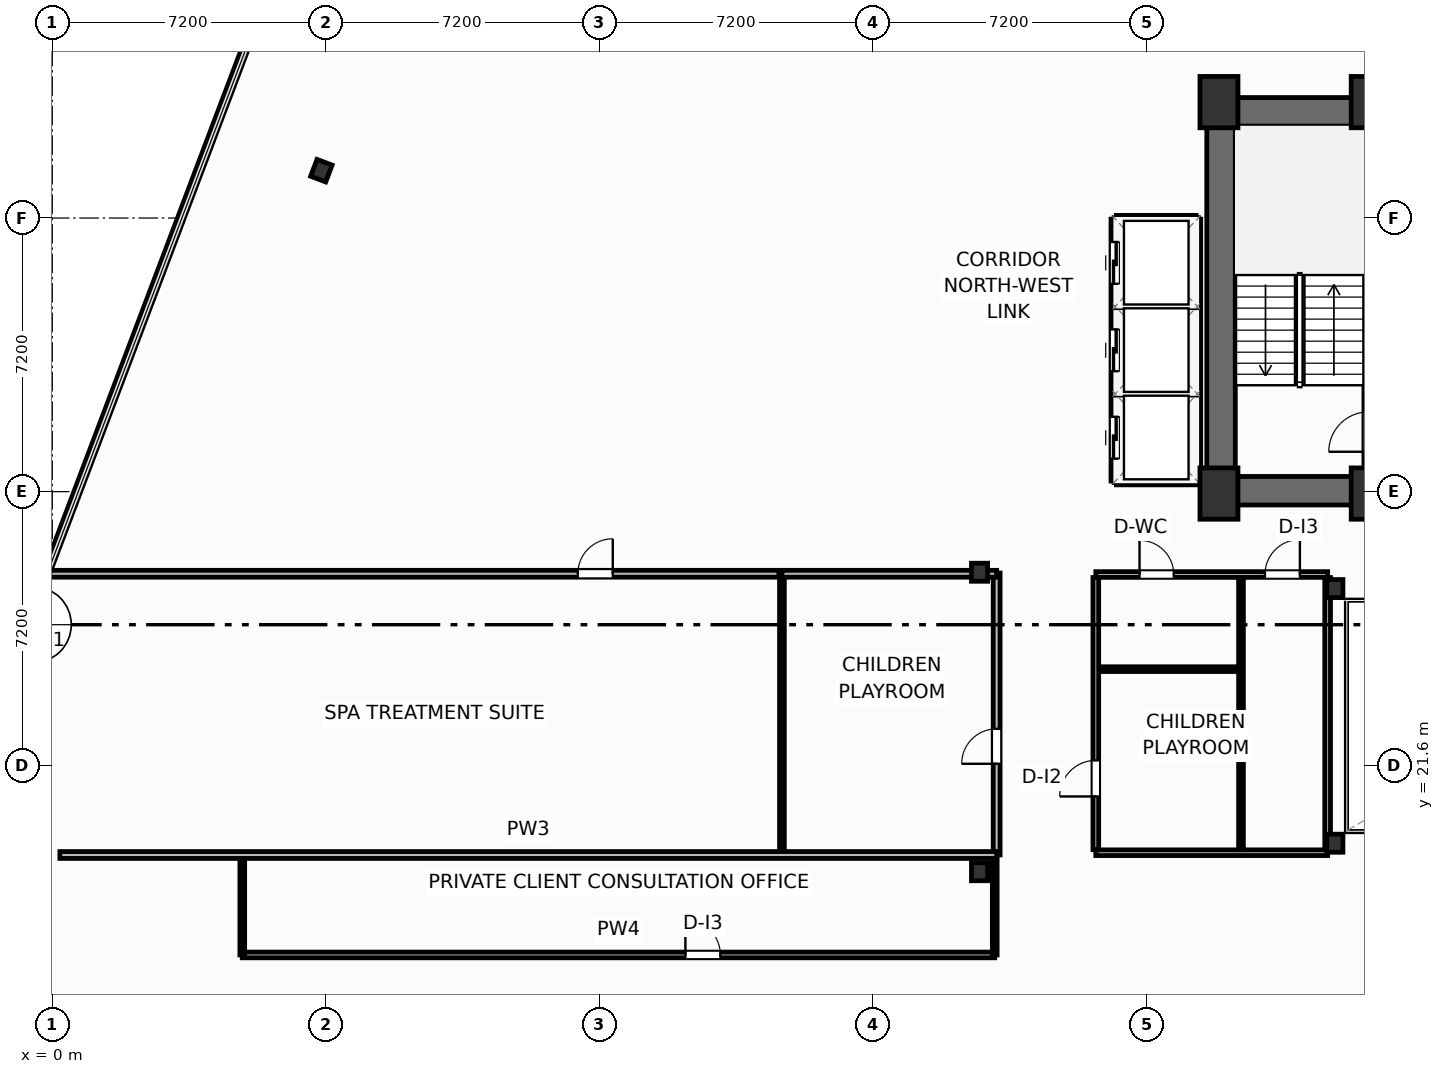
"""IFC4 building model, lengths in metres.
Left out: names, types, materials, properties, quantities, classifications, styles, units other than length and angle.
Written with IfcOpenShell. Run it as: python <this file> out.ifc"""

import sys

from ifc_helpers import new_model, si_unit, direction, frame, frame_2d, origin, origin_2d, place, context, subcontext, project, spatial, rectangle, i_section, extrude, element, fill, save


model = new_model("IFC4")
c1 = context("Model", 3, precision=1e-05, world=origin(), true_north=direction((0.0, 1.0)))
c2 = subcontext(c1, "Body", "Model", "MODEL_VIEW")
j1 = project(units=[si_unit("LENGTHUNIT", "METRE"), si_unit("PLANEANGLEUNIT", "RADIAN")], contexts=[c1])
p1 = place(None, origin())
s1 = spatial("IfcSite", under=j1, at=p1, CompositionType="ELEMENT")
p2 = place(p1, origin())
s2 = spatial("IfcBuilding", under=s1, at=p2, CompositionType="ELEMENT")
p3 = place(p2, frame((0.0, 0.0, 87.3)))
s3 = spatial("IfcBuildingStorey", under=s2, at=p3, CompositionType="ELEMENT", Elevation=87.3)
for number, where, z_axis, x_axis in (
    (1, (30.7, 28.75, 0.0), (0.0, 0.0, 1.0), (1.0, 0.0, 0.0)),
    (2, (34.68, 28.75, 0.0), (0.0, 0.0, 1.0), (1.0, 0.0, 0.0)),
    (3, (30.7, 39.05, 0.0), (0.0, 0.0, 1.0), (1.0, 0.0, 0.0)),
    (4, (34.68, 39.05, 0.0), (0.0, 0.0, 1.0), (1.0, 0.0, 0.0)),
):
    element("IfcColumn", number, at=place(p3, frame(where, z_axis=z_axis, x_axis=x_axis)), inside=s3, PredefinedType="COLUMN", context=c2, shape_type="SweptSolid", body=[
        extrude(rectangle(XDim=1.0, YDim=1.35, at=origin_2d()), origin(), (0.0, 0.0, 1.0), 3.7),
    ])
for number, where, z_axis, x_axis in (
    (5, (33.75, 19.55, 0.0), (0.0, 0.0, 1.0), (1.0, 0.0, 0.0)),
    (6, (33.75, 26.25, 0.0), (0.0, 0.0, 1.0), (1.0, 0.0, 0.0)),
    (7, (24.4, 18.8, 0.0), (0.0, 0.0, 1.0), (1.0, 0.0, 0.0)),
    (8, (24.4, 26.68, 0.0), (0.0, 0.0, 1.0), (1.0, 0.0, 0.0)),
):
    element("IfcColumn", number, at=place(p3, frame(where, z_axis=z_axis, x_axis=x_axis)), inside=s3, PredefinedType="COLUMN", context=c2, shape_type="SweptSolid", body=[
        extrude(i_section(OverallWidth=0.424, OverallDepth=0.474, WebThickness=0.048, FlangeThickness=0.077, FilletRadius=0.025, at=origin_2d()), origin(), (0.0, 0.0, 1.0), 3.7),
    ])
p4 = place(p3, frame((30.38, 38.795, 0.0), z_axis=(0.0, 0.0, 1.0), x_axis=(1.0, 0.0, 0.0)))
e9 = element("IfcWall", 9, at=p4, inside=s3, PredefinedType="SHEAR", context=c2, shape_type="SweptSolid", body=[
    extrude(rectangle(XDim=17.64, YDim=0.75, at=frame_2d((8.82, 0.0))), origin(), (0.0, 0.0, 1.0), 3.45),
])
p5 = place(p3, frame((30.755, 29.2, 0.0), z_axis=(0.0, 0.0, 1.0), x_axis=(0.0, 1.0, 0.0)))
e10 = element("IfcWall", 10, at=p5, inside=s3, PredefinedType="SHEAR", context=c2, shape_type="SweptSolid", body=[
    extrude(rectangle(XDim=9.22, YDim=0.75, at=frame_2d((4.61, 0.0))), origin(), (0.0, 0.0, 1.0), 3.45),
])
p6 = place(p3, frame((30.38, 28.825, 0.0), z_axis=(0.0, 0.0, 1.0), x_axis=(1.0, 0.0, 0.0)))
e11 = element("IfcWall", 11, at=p6, inside=s3, PredefinedType="SHEAR", context=c2, shape_type="SweptSolid", body=[
    extrude(rectangle(XDim=4.42, YDim=0.75, at=frame_2d((2.21, 0.0))), origin(), (0.0, 0.0, 1.0), 3.45),
])
p7 = place(p3, frame((34.64, 29.2, 0.0), z_axis=(0.0, 0.0, 1.0), x_axis=(0.0, 1.0, 0.0)))
e12 = element("IfcWall", 12, at=p7, inside=s3, PredefinedType="SHEAR", context=c2, shape_type="SweptSolid", body=[
    extrude(rectangle(XDim=9.22, YDim=0.25, at=frame_2d((4.61, 0.0))), origin(), (0.0, 0.0, 1.0), 3.45),
])
p8 = place(p7, frame((0.65, 0.0, 0.0)))
e13 = element("IfcOpeningElement", 13, at=p8, cuts=e12, PredefinedType="OPENING", context=c2, shape_type="SweptSolid", body=[
    extrude(rectangle(XDim=1.05, YDim=2.15, at=frame_2d((0.525, 1.075))), frame((0.0, 0.135, 0.0), z_axis=(0.0, -1.0, 0.0), x_axis=(1.0, 0.0, 0.0)), (0.0, 0.0, 1.0), 0.27),
])
p9 = place(p3, frame((7.081, 37.246, 0.0), z_axis=(0.0, 0.0, 1.0), x_axis=(0.935221751401, -0.354062530786, 0.0)))
e14 = element("IfcColumn", 14, at=p9, inside=s3, PredefinedType="COLUMN", context=c2, shape_type="SweptSolid", body=[
    extrude(i_section(OverallWidth=0.424, OverallDepth=0.474, WebThickness=0.048, FlangeThickness=0.077, FilletRadius=0.025, at=origin_2d()), origin(), (0.0, 0.0, 1.0), 3.7),
])
p10 = place(p3, frame((5.0, 16.61, 0.0), z_axis=(0.0, 0.0, 1.0), x_axis=(1.0, 0.0, 0.0)))
e15 = element("IfcWall", 15, at=p10, inside=s3, PredefinedType="PARTITIONING", context=c2, shape_type="SweptSolid", body=[
    extrude(rectangle(XDim=19.8, YDim=0.15, at=frame_2d((9.9, 0.0))), origin(), (0.0, 0.0, 1.0), 3.45),
])
p11 = place(p10, frame((11.66, 0.0, 0.0)))
e16 = element("IfcOpeningElement", 16, at=p11, cuts=e15, PredefinedType="OPENING", context=c2, shape_type="SweptSolid", body=[
    extrude(rectangle(XDim=0.92, YDim=2.05, at=frame_2d((0.46, 1.025))), frame((0.0, 0.085, 0.0), z_axis=(0.0, -1.0, 0.0), x_axis=(1.0, 0.0, 0.0)), (0.0, 0.0, 1.0), 0.17),
])
for number, where, z_axis, x_axis in (
    (17, (5.0, 16.61, 0.0), (0.0, 0.0, 1.0), (0.0, 1.0, 0.0)),
    (18, (24.8, 16.61, 0.0), (0.0, 0.0, 1.0), (0.0, 1.0, 0.0)),
):
    element("IfcWall", number, at=place(p3, frame(where, z_axis=z_axis, x_axis=x_axis)), inside=s3, PredefinedType="PARTITIONING", context=c2, shape_type="SweptSolid", body=[
        extrude(rectangle(XDim=2.63, YDim=0.125, at=frame_2d((1.315, 0.0))), origin(), (0.0, 0.0, 1.0), 3.45),
    ])
p12 = place(p3, frame((-0.094, 26.64, 0.0), z_axis=(0.0, 0.0, 1.0), x_axis=(1.0, 0.0, 0.0)))
e19 = element("IfcWall", 19, at=p12, inside=s3, PredefinedType="PARTITIONING", context=c2, shape_type="SweptSolid", body=[
    extrude(rectangle(XDim=19.214, YDim=0.18, at=frame_2d((9.607, 0.0))), origin(), (0.0, 0.0, 1.0), 3.45),
])
p13 = place(p12, frame((13.923, 0.0, 0.0)))
e20 = element("IfcOpeningElement", 20, at=p13, cuts=e19, PredefinedType="OPENING", context=c2, shape_type="SweptSolid", body=[
    extrude(rectangle(XDim=0.92, YDim=2.05, at=frame_2d((0.46, 1.025))), frame((0.0, 0.1, 0.0), z_axis=(0.0, -1.0, 0.0), x_axis=(1.0, 0.0, 0.0)), (0.0, 0.0, 1.0), 0.2),
])
p14 = place(p3, frame((24.85, 19.24, 0.0), z_axis=(0.0, 0.0, 1.0), x_axis=(0.0, 1.0, 0.0)))
e21 = element("IfcWall", 21, at=p14, inside=s3, PredefinedType="PARTITIONING", context=c2, shape_type="SweptSolid", body=[
    extrude(rectangle(XDim=7.42, YDim=0.18, at=frame_2d((3.71, 0.0))), origin(), (0.0, 0.0, 1.0), 3.45),
])
p15 = place(p14, frame((2.4, 0.0, 0.0)))
e22 = element("IfcOpeningElement", 22, at=p15, cuts=e21, PredefinedType="OPENING", context=c2, shape_type="SweptSolid", body=[
    extrude(rectangle(XDim=0.92, YDim=2.05, at=frame_2d((0.46, 1.025))), frame((0.0, 0.1, 0.0), z_axis=(0.0, -1.0, 0.0), x_axis=(1.0, 0.0, 0.0)), (0.0, 0.0, 1.0), 0.2),
])
p16 = place(p3, frame((19.2, 19.24, 0.0), z_axis=(0.0, 0.0, 1.0), x_axis=(0.0, 1.0, 0.0)))
e23 = element("IfcWall", 23, at=p16, inside=s3, PredefinedType="PARTITIONING", context=c2, shape_type="SweptSolid", body=[
    extrude(rectangle(XDim=7.42, YDim=0.125, at=frame_2d((3.71, 0.0))), origin(), (0.0, 0.0, 1.0), 3.45),
])
p17 = place(p3, frame((0.2, 19.24, 0.0), z_axis=(0.0, 0.0, 1.0), x_axis=(1.0, 0.0, 0.0)))
e24 = element("IfcWall", 24, at=p17, inside=s3, PredefinedType="PARTITIONING", context=c2, shape_type="SweptSolid", body=[
    extrude(rectangle(XDim=24.65, YDim=0.18, at=frame_2d((12.325, 0.0))), origin(), (0.0, 0.0, 1.0), 3.45),
])
p18 = place(p3, frame((19.2, 26.64, 0.0), z_axis=(0.0, 0.0, 1.0), x_axis=(1.0, 0.0, 0.0)))
e25 = element("IfcWall", 25, at=p18, inside=s3, PredefinedType="PARTITIONING", context=c2, shape_type="SweptSolid", body=[
    extrude(rectangle(XDim=5.65, YDim=0.18, at=frame_2d((2.825, 0.0))), origin(), (0.0, 0.0, 1.0), 2.662),
])
p19 = place(p3, frame((27.46, 19.3, 0.0), z_axis=(0.0, 0.0, 1.0), x_axis=(1.0, 0.0, 0.0)))
e26 = element("IfcWall", 26, at=p19, inside=s3, PredefinedType="PARTITIONING", context=c2, shape_type="SweptSolid", body=[
    extrude(rectangle(XDim=6.1, YDim=0.15, at=frame_2d((3.05, 0.0))), origin(), (0.0, 0.0, 1.0), 2.662),
])
p20 = place(p3, frame((27.46, 26.62, 0.0), z_axis=(0.0, 0.0, 1.0), x_axis=(1.0, 0.0, 0.0)))
e27 = element("IfcWall", 27, at=p20, inside=s3, PredefinedType="PARTITIONING", context=c2, shape_type="SweptSolid", body=[
    extrude(rectangle(XDim=6.1, YDim=0.15, at=frame_2d((3.05, 0.0))), origin(), (0.0, 0.0, 1.0), 2.662),
])
p21 = place(p20, frame((1.15, 0.0, 0.0)))
e28 = element("IfcOpeningElement", 28, at=p21, cuts=e27, PredefinedType="OPENING", context=c2, shape_type="SweptSolid", body=[
    extrude(rectangle(XDim=0.9, YDim=2.05, at=frame_2d((0.45, 1.025))), frame((0.0, 0.085, 0.0), z_axis=(0.0, -1.0, 0.0), x_axis=(1.0, 0.0, 0.0)), (0.0, 0.0, 1.0), 0.17),
])
p22 = place(p20, frame((4.45, 0.0, 0.0)))
e29 = element("IfcOpeningElement", 29, at=p22, cuts=e27, PredefinedType="OPENING", context=c2, shape_type="SweptSolid", body=[
    extrude(rectangle(XDim=0.92, YDim=2.05, at=frame_2d((0.46, 1.025))), frame((0.0, 0.085, 0.0), z_axis=(0.0, -1.0, 0.0), x_axis=(1.0, 0.0, 0.0)), (0.0, 0.0, 1.0), 0.17),
])
p23 = place(p3, frame((31.28, 19.38, 0.0), z_axis=(0.0, 0.0, 1.0), x_axis=(0.0, 1.0, 0.0)))
e30 = element("IfcWall", 30, at=p23, inside=s3, PredefinedType="PARTITIONING", context=c2, shape_type="SweptSolid", body=[
    extrude(rectangle(XDim=7.16, YDim=0.125, at=frame_2d((3.58, 0.0))), origin(), (0.0, 0.0, 1.0), 3.45),
])
p24 = place(p3, frame((27.52, 24.13, 0.0), z_axis=(0.0, 0.0, 1.0), x_axis=(1.0, 0.0, 0.0)))
e31 = element("IfcWall", 31, at=p24, inside=s3, PredefinedType="PARTITIONING", context=c2, shape_type="SweptSolid", body=[
    extrude(rectangle(XDim=3.7, YDim=0.125, at=frame_2d((1.85, 0.0))), origin(), (0.0, 0.0, 1.0), 3.45),
])
p25 = place(p3, frame((27.46, 19.38, 0.0), z_axis=(0.0, 0.0, 1.0), x_axis=(0.0, 1.0, 0.0)))
e32 = element("IfcWall", 32, at=p25, inside=s3, PredefinedType="PARTITIONING", context=c2, shape_type="SweptSolid", body=[
    extrude(rectangle(XDim=7.16, YDim=0.15, at=frame_2d((3.58, 0.0))), origin(), (0.0, 0.0, 1.0), 3.45),
])
p26 = place(p25, frame((1.4, 0.0, 0.0)))
e33 = element("IfcOpeningElement", 33, at=p26, cuts=e32, PredefinedType="OPENING", context=c2, shape_type="SweptSolid", body=[
    extrude(rectangle(XDim=0.95, YDim=2.05, at=frame_2d((0.475, 1.025))), frame((0.0, 0.085, 0.0), z_axis=(0.0, -1.0, 0.0), x_axis=(1.0, 0.0, 0.0)), (0.0, 0.0, 1.0), 0.17),
])
p27 = place(p3, frame((33.56, 19.38, 0.0), z_axis=(0.0, 0.0, 1.0), x_axis=(0.0, 1.0, 0.0)))
e34 = element("IfcWall", 34, at=p27, inside=s3, PredefinedType="PARTITIONING", context=c2, shape_type="SweptSolid", body=[
    extrude(rectangle(XDim=7.16, YDim=0.15, at=frame_2d((3.58, 0.0))), origin(), (0.0, 0.0, 1.0), 2.824),
])
for number, where, z_axis, x_axis in (
    (35, (28.02, 31.375, 0.0), (0.0, 0.0, 1.0), (1.0, 0.0, 0.0)),
    (36, (28.02, 33.675, 0.0), (0.0, 0.0, 1.0), (1.0, 0.0, 0.0)),
):
    element("IfcWall", number, at=place(p3, frame(where, z_axis=z_axis, x_axis=x_axis)), inside=s3, PredefinedType="PARTITIONING", context=c2, shape_type="SweptSolid", body=[
        extrude(rectangle(XDim=2.06, YDim=0.2, at=frame_2d((1.03, 0.0))), origin(), (0.0, 0.0, 1.0), 3.45),
    ])
for number, where, z_axis, x_axis in (
    (37, (28.0, 29.08, 0.0), (0.0, 0.0, 1.0), (1.0, 0.0, 0.0)),
    (38, (28.0, 35.97, 0.0), (0.0, 0.0, 1.0), (1.0, 0.0, 0.0)),
):
    element("IfcWall", number, at=place(p3, frame(where, z_axis=z_axis, x_axis=x_axis)), inside=s3, PredefinedType="PARTITIONING", context=c2, shape_type="SweptSolid", body=[
        extrude(rectangle(XDim=2.1, YDim=0.2, at=frame_2d((1.05, 0.0))), origin(), (0.0, 0.0, 1.0), 3.45),
    ])
p28 = place(p3, frame((30.12, 29.08, 0.0), z_axis=(0.0, 0.0, 1.0), x_axis=(0.0, 1.0, 0.0)))
e39 = element("IfcWall", 39, at=p28, inside=s3, PredefinedType="PARTITIONING", context=c2, shape_type="SweptSolid", body=[
    extrude(rectangle(XDim=6.89, YDim=0.2, at=frame_2d((3.445, 0.0))), origin(), (0.0, 0.0, 1.0), 3.45),
])
p29 = place(p3, frame((27.96, 29.08, 0.0), z_axis=(0.0, 0.0, 1.0), x_axis=(0.0, 1.0, 0.0)))
e40 = element("IfcWall", 40, at=p29, inside=s3, PredefinedType="PARTITIONING", context=c2, shape_type="SweptSolid", body=[
    extrude(rectangle(XDim=6.89, YDim=0.2, at=frame_2d((3.445, 0.0))), origin(), (0.0, 0.0, 1.0), 3.45),
])
p30 = place(p29, frame((0.59, 0.0, 0.0)))
e41 = element("IfcOpeningElement", 41, at=p30, cuts=e40, PredefinedType="OPENING", context=c2, shape_type="SweptSolid", body=[
    extrude(rectangle(XDim=1.1, YDim=2.15, at=frame_2d((0.55, 1.075))), frame((0.0, 0.11, 0.0), z_axis=(0.0, -1.0, 0.0), x_axis=(1.0, 0.0, 0.0)), (0.0, 0.0, 1.0), 0.22),
])
p31 = place(p29, frame((2.89, 0.0, 0.0)))
e42 = element("IfcOpeningElement", 42, at=p31, cuts=e40, PredefinedType="OPENING", context=c2, shape_type="SweptSolid", body=[
    extrude(rectangle(XDim=1.1, YDim=2.15, at=frame_2d((0.55, 1.075))), frame((0.0, 0.11, 0.0), z_axis=(0.0, -1.0, 0.0), x_axis=(1.0, 0.0, 0.0)), (0.0, 0.0, 1.0), 0.22),
])
p32 = place(p29, frame((5.19, 0.0, 0.0)))
e43 = element("IfcOpeningElement", 43, at=p32, cuts=e40, PredefinedType="OPENING", context=c2, shape_type="SweptSolid", body=[
    extrude(rectangle(XDim=1.1, YDim=2.15, at=frame_2d((0.55, 1.075))), frame((0.0, 0.11, 0.0), z_axis=(0.0, -1.0, 0.0), x_axis=(1.0, 0.0, 0.0)), (0.0, 0.0, 1.0), 0.22),
])
p33 = place(p11, origin())
e44 = element("IfcDoor", 44, at=p33, inside=s3, OperationType="SINGLE_SWING_LEFT", PredefinedType="DOOR", context=c2, shape_type="SweptSolid", body=[
    extrude(rectangle(XDim=0.92, YDim=2.05, at=frame_2d((0.46, 1.025))), frame((0.0, 0.025, 0.0), z_axis=(0.0, -1.0, 0.0), x_axis=(1.0, 0.0, 0.0)), (0.0, 0.0, 1.0), 0.05),
])
fill(e16, e44)
p34 = place(p13, origin())
e45 = element("IfcDoor", 45, at=p34, inside=s3, OperationType="SINGLE_SWING_RIGHT", PredefinedType="DOOR", context=c2, shape_type="SweptSolid", body=[
    extrude(rectangle(XDim=0.92, YDim=2.05, at=frame_2d((0.46, 1.025))), frame((0.0, 0.025, 0.0), z_axis=(0.0, -1.0, 0.0), x_axis=(1.0, 0.0, 0.0)), (0.0, 0.0, 1.0), 0.05),
])
fill(e20, e45)
p35 = place(p15, origin())
e46 = element("IfcDoor", 46, at=p35, inside=s3, OperationType="SINGLE_SWING_LEFT", PredefinedType="DOOR", context=c2, shape_type="SweptSolid", body=[
    extrude(rectangle(XDim=0.92, YDim=2.05, at=frame_2d((0.46, 1.025))), frame((0.0, 0.025, 0.0), z_axis=(0.0, -1.0, 0.0), x_axis=(1.0, 0.0, 0.0)), (0.0, 0.0, 1.0), 0.05),
])
fill(e22, e46)
p36 = place(p21, origin())
e47 = element("IfcDoor", 47, at=p36, inside=s3, OperationType="SINGLE_SWING_LEFT", PredefinedType="DOOR", context=c2, shape_type="SweptSolid", body=[
    extrude(rectangle(XDim=0.9, YDim=2.05, at=frame_2d((0.45, 1.025))), frame((0.0, 0.025, 0.0), z_axis=(0.0, -1.0, 0.0), x_axis=(1.0, 0.0, 0.0)), (0.0, 0.0, 1.0), 0.05),
])
fill(e28, e47)
p37 = place(p22, origin())
e48 = element("IfcDoor", 48, at=p37, inside=s3, OperationType="SINGLE_SWING_RIGHT", PredefinedType="DOOR", context=c2, shape_type="SweptSolid", body=[
    extrude(rectangle(XDim=0.92, YDim=2.05, at=frame_2d((0.46, 1.025))), frame((0.0, 0.025, 0.0), z_axis=(0.0, -1.0, 0.0), x_axis=(1.0, 0.0, 0.0)), (0.0, 0.0, 1.0), 0.05),
])
fill(e29, e48)
p38 = place(p26, origin())
e49 = element("IfcDoor", 49, at=p38, inside=s3, OperationType="SINGLE_SWING_LEFT", PredefinedType="DOOR", context=c2, shape_type="SweptSolid", body=[
    extrude(rectangle(XDim=0.95, YDim=2.05, at=frame_2d((0.475, 1.025))), frame((0.0, 0.025, 0.0), z_axis=(0.0, -1.0, 0.0), x_axis=(1.0, 0.0, 0.0)), (0.0, 0.0, 1.0), 0.05),
])
fill(e33, e49)
p39 = place(p30, origin())
e50 = element("IfcDoor", 50, at=p39, inside=s3, OperationType="SLIDING_TO_LEFT", PredefinedType="DOOR", context=c2, shape_type="SweptSolid", body=[
    extrude(rectangle(XDim=1.1, YDim=2.15, at=frame_2d((0.55, 1.075))), frame((0.0, 0.025, 0.0), z_axis=(0.0, -1.0, 0.0), x_axis=(1.0, 0.0, 0.0)), (0.0, 0.0, 1.0), 0.05),
])
fill(e41, e50)
p40 = place(p31, origin())
e51 = element("IfcDoor", 51, at=p40, inside=s3, OperationType="SLIDING_TO_LEFT", PredefinedType="DOOR", context=c2, shape_type="SweptSolid", body=[
    extrude(rectangle(XDim=1.1, YDim=2.15, at=frame_2d((0.55, 1.075))), frame((0.0, 0.025, 0.0), z_axis=(0.0, -1.0, 0.0), x_axis=(1.0, 0.0, 0.0)), (0.0, 0.0, 1.0), 0.05),
])
fill(e42, e51)
p41 = place(p32, origin())
e52 = element("IfcDoor", 52, at=p41, inside=s3, OperationType="SLIDING_TO_LEFT", PredefinedType="DOOR", context=c2, shape_type="SweptSolid", body=[
    extrude(rectangle(XDim=1.1, YDim=2.15, at=frame_2d((0.55, 1.075))), frame((0.0, 0.025, 0.0), z_axis=(0.0, -1.0, 0.0), x_axis=(1.0, 0.0, 0.0)), (0.0, 0.0, 1.0), 0.05),
])
fill(e43, e52)
save(model, sys.argv[1])
